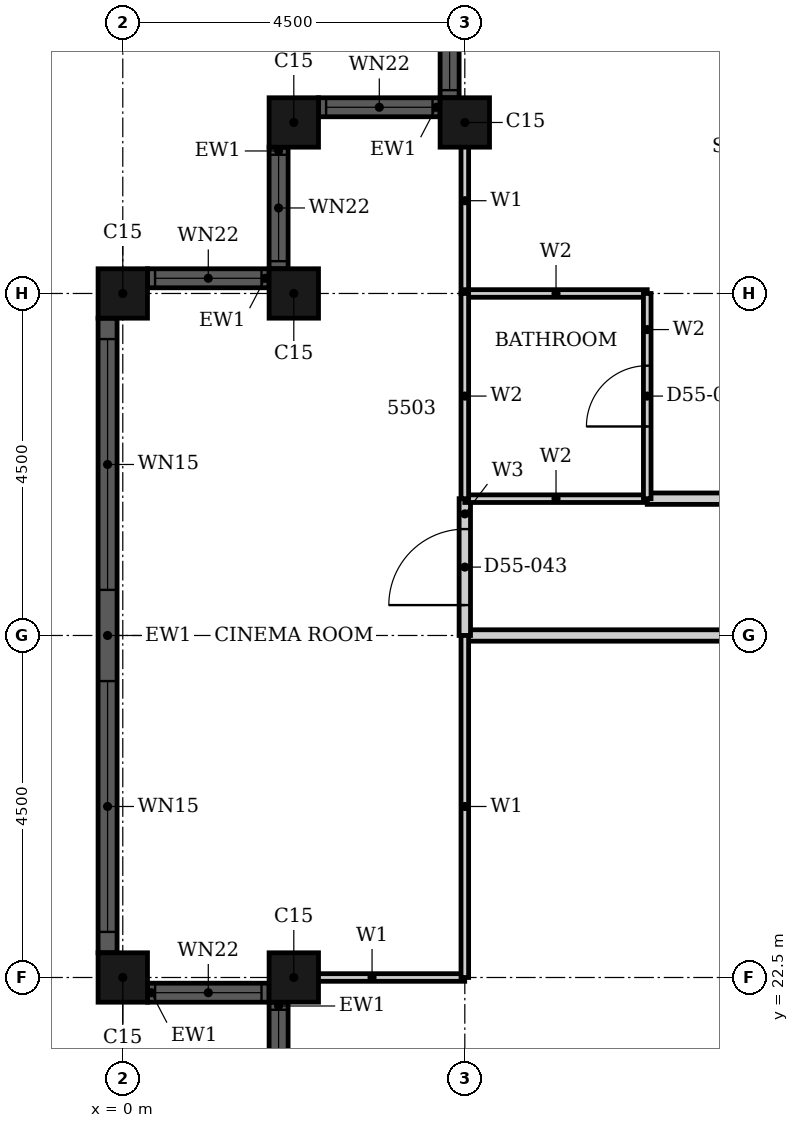
"""IFC4 building model, lengths in metres.
Left out: names, types, materials, properties, quantities, classifications, styles, units other than length and angle.
Written with IfcOpenShell. Run it as: python <this file> out.ifc"""

import sys

from ifc_helpers import new_model, si_unit, direction, frame, frame_2d, origin, origin_2d, place, context, subcontext, project, spatial, rectangle, hollow_rectangle, extrude, element, fill, save


model = new_model("IFC4")
c1 = context("Model", 3, precision=1e-05, world=origin(), true_north=direction((0.0, 1.0)))
c2 = subcontext(c1, "Body", "Model", "MODEL_VIEW")
j1 = project(units=[si_unit("LENGTHUNIT", "METRE"), si_unit("PLANEANGLEUNIT", "RADIAN")], contexts=[c1])
p1 = place(None, origin())
s1 = spatial("IfcSite", under=j1, at=p1, CompositionType="ELEMENT")
p2 = place(p1, origin())
s2 = spatial("IfcBuilding", under=s1, at=p2, CompositionType="ELEMENT")
p3 = place(p2, frame((0.0, 0.0, 218.3)))
s3 = spatial("IfcBuildingStorey", under=s2, at=p3, CompositionType="ELEMENT", Elevation=218.3)
for number, where, z_axis, x_axis in (
    (1, (4.5, 33.75, 0.0), (0.0, 0.0, 1.0), (1.0, 0.0, 0.0)),
    (2, (2.25, 33.75, 0.0), (0.0, 0.0, 1.0), (1.0, 0.0, 0.0)),
    (3, (2.25, 31.5, 0.0), (0.0, 0.0, 1.0), (1.0, 0.0, 0.0)),
    (4, (0.0, 31.5, 0.0), (0.0, 0.0, 1.0), (1.0, 0.0, 0.0)),
    (5, (0.0, 22.5, 0.0), (0.0, 0.0, 1.0), (1.0, 0.0, 0.0)),
    (6, (2.25, 22.5, 0.0), (0.0, 0.0, 1.0), (1.0, 0.0, 0.0)),
):
    element("IfcColumn", number, at=place(p3, frame(where, z_axis=z_axis, x_axis=x_axis)), inside=s3, PredefinedType="COLUMN", context=c2, shape_type="SweptSolid", body=[
        extrude(hollow_rectangle(XDim=0.65, YDim=0.65, WallThickness=0.021, at=origin_2d()), origin(), (0.0, 0.0, 1.0), 3.7),
    ])
p4 = place(p3, frame((4.3, 35.675, 0.0), z_axis=(0.0, 0.0, 1.0), x_axis=(0.0, -1.0, 0.0)))
e7 = element("IfcWall", 7, at=p4, inside=s3, PredefinedType="SOLIDWALL", context=c2, shape_type="SweptSolid", body=[
    extrude(rectangle(XDim=1.6, YDim=0.25, at=frame_2d((0.8, 0.0))), origin(), (0.0, 0.0, 1.0), 3.7),
])
p5 = place(p4, frame((0.1, 0.0, 0.9)))
e8 = element("IfcOpeningElement", 8, at=p5, cuts=e7, PredefinedType="OPENING", context=c2, shape_type="SweptSolid", body=[
    extrude(rectangle(XDim=1.4, YDim=1.85, at=frame_2d((0.7, 0.925))), frame((0.0, 0.135, 0.0), z_axis=(0.0, -1.0, 0.0), x_axis=(1.0, 0.0, 0.0)), (0.0, 0.0, 1.0), 0.27),
])
p6 = place(p3, frame((4.175, 33.95, 0.0), z_axis=(0.0, 0.0, 1.0), x_axis=(-1.0, 0.0, 0.0)))
e9 = element("IfcWall", 9, at=p6, inside=s3, PredefinedType="SOLIDWALL", context=c2, shape_type="SweptSolid", body=[
    extrude(rectangle(XDim=1.6, YDim=0.25, at=frame_2d((0.8, 0.0))), origin(), (0.0, 0.0, 1.0), 3.7),
])
p7 = place(p6, frame((0.1, 0.0, 0.9)))
e10 = element("IfcOpeningElement", 10, at=p7, cuts=e9, PredefinedType="OPENING", context=c2, shape_type="SweptSolid", body=[
    extrude(rectangle(XDim=1.4, YDim=1.85, at=frame_2d((0.7, 0.925))), frame((0.0, 0.135, 0.0), z_axis=(0.0, -1.0, 0.0), x_axis=(1.0, 0.0, 0.0)), (0.0, 0.0, 1.0), 0.27),
])
p8 = place(p3, frame((2.05, 33.425, 0.0), z_axis=(0.0, 0.0, 1.0), x_axis=(0.0, -1.0, 0.0)))
e11 = element("IfcWall", 11, at=p8, inside=s3, PredefinedType="SOLIDWALL", context=c2, shape_type="SweptSolid", body=[
    extrude(rectangle(XDim=1.6, YDim=0.25, at=frame_2d((0.8, 0.0))), origin(), (0.0, 0.0, 1.0), 3.7),
])
p9 = place(p8, frame((0.1, 0.0, 0.9)))
e12 = element("IfcOpeningElement", 12, at=p9, cuts=e11, PredefinedType="OPENING", context=c2, shape_type="SweptSolid", body=[
    extrude(rectangle(XDim=1.4, YDim=1.85, at=frame_2d((0.7, 0.925))), frame((0.0, 0.135, 0.0), z_axis=(0.0, -1.0, 0.0), x_axis=(1.0, 0.0, 0.0)), (0.0, 0.0, 1.0), 0.27),
])
p10 = place(p3, frame((1.925, 31.7, 0.0), z_axis=(0.0, 0.0, 1.0), x_axis=(-1.0, 0.0, 0.0)))
e13 = element("IfcWall", 13, at=p10, inside=s3, PredefinedType="SOLIDWALL", context=c2, shape_type="SweptSolid", body=[
    extrude(rectangle(XDim=1.6, YDim=0.25, at=frame_2d((0.8, 0.0))), origin(), (0.0, 0.0, 1.0), 3.7),
])
p11 = place(p10, frame((0.1, 0.0, 0.9)))
e14 = element("IfcOpeningElement", 14, at=p11, cuts=e13, PredefinedType="OPENING", context=c2, shape_type="SweptSolid", body=[
    extrude(rectangle(XDim=1.4, YDim=1.85, at=frame_2d((0.7, 0.925))), frame((0.0, 0.135, 0.0), z_axis=(0.0, -1.0, 0.0), x_axis=(1.0, 0.0, 0.0)), (0.0, 0.0, 1.0), 0.27),
])
p12 = place(p3, frame((-0.2, 31.175, 0.0), z_axis=(0.0, 0.0, 1.0), x_axis=(0.0, -1.0, 0.0)))
e15 = element("IfcWall", 15, at=p12, inside=s3, PredefinedType="SOLIDWALL", context=c2, shape_type="SweptSolid", body=[
    extrude(rectangle(XDim=8.35, YDim=0.25, at=frame_2d((4.175, 0.0))), origin(), (0.0, 0.0, 1.0), 3.7),
])
p13 = place(p12, frame((0.275, 0.0, 0.45)))
e16 = element("IfcOpeningElement", 16, at=p13, cuts=e15, PredefinedType="OPENING", context=c2, shape_type="SweptSolid", body=[
    extrude(rectangle(XDim=3.3, YDim=2.3, at=frame_2d((1.65, 1.15))), frame((0.0, 0.135, 0.0), z_axis=(0.0, -1.0, 0.0), x_axis=(1.0, 0.0, 0.0)), (0.0, 0.0, 1.0), 0.27),
])
p14 = place(p12, frame((4.775, 0.0, 0.45)))
e17 = element("IfcOpeningElement", 17, at=p14, cuts=e15, PredefinedType="OPENING", context=c2, shape_type="SweptSolid", body=[
    extrude(rectangle(XDim=3.3, YDim=2.3, at=frame_2d((1.65, 1.15))), frame((0.0, 0.135, 0.0), z_axis=(0.0, -1.0, 0.0), x_axis=(1.0, 0.0, 0.0)), (0.0, 0.0, 1.0), 0.27),
])
p15 = place(p3, frame((0.325, 22.3, 0.0), z_axis=(0.0, 0.0, 1.0), x_axis=(1.0, 0.0, 0.0)))
e18 = element("IfcWall", 18, at=p15, inside=s3, PredefinedType="SOLIDWALL", context=c2, shape_type="SweptSolid", body=[
    extrude(rectangle(XDim=1.6, YDim=0.25, at=frame_2d((0.8, 0.0))), origin(), (0.0, 0.0, 1.0), 3.7),
])
p16 = place(p15, frame((0.1, 0.0, 0.9)))
e19 = element("IfcOpeningElement", 19, at=p16, cuts=e18, PredefinedType="OPENING", context=c2, shape_type="SweptSolid", body=[
    extrude(rectangle(XDim=1.4, YDim=1.85, at=frame_2d((0.7, 0.925))), frame((0.0, 0.135, 0.0), z_axis=(0.0, -1.0, 0.0), x_axis=(1.0, 0.0, 0.0)), (0.0, 0.0, 1.0), 0.27),
])
p17 = place(p3, frame((2.05, 22.175, 0.0), z_axis=(0.0, 0.0, 1.0), x_axis=(0.0, -1.0, 0.0)))
e20 = element("IfcWall", 20, at=p17, inside=s3, PredefinedType="SOLIDWALL", context=c2, shape_type="SweptSolid", body=[
    extrude(rectangle(XDim=1.6, YDim=0.25, at=frame_2d((0.8, 0.0))), origin(), (0.0, 0.0, 1.0), 3.7),
])
p18 = place(p17, frame((0.1, 0.0, 0.9)))
e21 = element("IfcOpeningElement", 21, at=p18, cuts=e20, PredefinedType="OPENING", context=c2, shape_type="SweptSolid", body=[
    extrude(rectangle(XDim=1.4, YDim=1.85, at=frame_2d((0.7, 0.925))), frame((0.0, 0.135, 0.0), z_axis=(0.0, -1.0, 0.0), x_axis=(1.0, 0.0, 0.0)), (0.0, 0.0, 1.0), 0.27),
])
p19 = place(p3, frame((4.5, 27.0, 0.0), z_axis=(0.0, 0.0, 1.0), x_axis=(1.0, 0.0, 0.0)))
e22 = element("IfcWall", 22, at=p19, inside=s3, PredefinedType="PARTITIONING", context=c2, shape_type="SweptSolid", body=[
    extrude(rectangle(XDim=13.5, YDim=0.15, at=frame_2d((6.75, 0.0))), origin(), (0.0, 0.0, 1.0), 2.68),
])
p20 = place(p19, frame((5.35, 0.0, 0.0)))
e23 = element("IfcOpeningElement", 23, at=p20, cuts=e22, PredefinedType="OPENING", context=c2, shape_type="SweptSolid", body=[
    extrude(rectangle(XDim=1.0, YDim=2.1, at=frame_2d((0.5, 1.05))), frame((0.0, 0.085, 0.0), z_axis=(0.0, -1.0, 0.0), x_axis=(1.0, 0.0, 0.0)), (0.0, 0.0, 1.0), 0.17),
])
p21 = place(p3, frame((6.9, 28.8, 0.0), z_axis=(0.0, 0.0, 1.0), x_axis=(1.0, 0.0, 0.0)))
e24 = element("IfcWall", 24, at=p21, inside=s3, PredefinedType="PARTITIONING", context=c2, shape_type="SweptSolid", body=[
    extrude(rectangle(XDim=9.299, YDim=0.15, at=frame_2d((4.649, 0.0))), origin(), (0.0, 0.0, 1.0), 3.4),
])
p22 = place(p3, frame((4.5, 27.0, 0.0), z_axis=(0.0, 0.0, 1.0), x_axis=(0.0, 1.0, 0.0)))
e25 = element("IfcWall", 25, at=p22, inside=s3, PredefinedType="PARTITIONING", context=c2, shape_type="SweptSolid", body=[
    extrude(rectangle(XDim=1.8, YDim=0.15, at=frame_2d((0.9, 0.0))), origin(), (0.0, 0.0, 1.0), 3.4),
])
p23 = place(p22, frame((0.4, 0.0, 0.0)))
e26 = element("IfcOpeningElement", 26, at=p23, cuts=e25, PredefinedType="OPENING", context=c2, shape_type="SweptSolid", body=[
    extrude(rectangle(XDim=1.0, YDim=2.1, at=frame_2d((0.5, 1.05))), frame((0.0, 0.085, 0.0), z_axis=(0.0, -1.0, 0.0), x_axis=(1.0, 0.0, 0.0)), (0.0, 0.0, 1.0), 0.17),
])
p24 = place(p3, frame((2.06, 22.5, 0.0), z_axis=(0.0, 0.0, 1.0), x_axis=(1.0, 0.0, 0.0)))
e27 = element("IfcWall", 27, at=p24, inside=s3, PredefinedType="PARTITIONING", context=c2, shape_type="SweptSolid", body=[
    extrude(rectangle(XDim=2.439, YDim=0.1, at=frame_2d((1.219, 0.0))), origin(), (0.0, 0.0, 1.0), 2.68),
])
p25 = place(p3, frame((4.5, 31.501, 0.0), z_axis=(0.0, 0.0, 1.0), x_axis=(0.0, 1.0, 0.0)))
e28 = element("IfcWall", 28, at=p25, inside=s3, PredefinedType="PARTITIONING", context=c2, shape_type="SweptSolid", body=[
    extrude(rectangle(XDim=2.439, YDim=0.1, at=frame_2d((1.219, 0.0))), origin(), (0.0, 0.0, 1.0), 3.4),
])
p26 = place(p3, frame((4.5, 22.5, 0.0), z_axis=(0.0, 0.0, 1.0), x_axis=(0.0, 1.0, 0.0)))
e29 = element("IfcWall", 29, at=p26, inside=s3, PredefinedType="PARTITIONING", context=c2, shape_type="SweptSolid", body=[
    extrude(rectangle(XDim=4.5, YDim=0.1, at=frame_2d((2.25, 0.0))), origin(), (0.0, 0.0, 1.0), 3.4),
])
p27 = place(p3, frame((4.5, 28.8, 0.0), z_axis=(0.0, 0.0, 1.0), x_axis=(1.0, 0.0, 0.0)))
e30 = element("IfcWall", 30, at=p27, inside=s3, PredefinedType="PARTITIONING", context=c2, shape_type="SweptSolid", body=[
    extrude(rectangle(XDim=2.4, YDim=0.1, at=frame_2d((1.2, 0.0))), origin(), (0.0, 0.0, 1.0), 3.4),
])
p28 = place(p3, frame((4.5, 31.5, 0.0), z_axis=(0.0, 0.0, 1.0), x_axis=(1.0, 0.0, 0.0)))
e31 = element("IfcWall", 31, at=p28, inside=s3, PredefinedType="PARTITIONING", context=c2, shape_type="SweptSolid", body=[
    extrude(rectangle(XDim=2.4, YDim=0.1, at=frame_2d((1.2, 0.0))), origin(), (0.0, 0.0, 1.0), 2.68),
])
p29 = place(p3, frame((4.5, 28.8, 0.0), z_axis=(0.0, 0.0, 1.0), x_axis=(0.0, 1.0, 0.0)))
e32 = element("IfcWall", 32, at=p29, inside=s3, PredefinedType="PARTITIONING", context=c2, shape_type="SweptSolid", body=[
    extrude(rectangle(XDim=2.7, YDim=0.1, at=frame_2d((1.35, 0.0))), origin(), (0.0, 0.0, 1.0), 3.4),
])
p30 = place(p3, frame((6.9, 28.8, 0.0), z_axis=(0.0, 0.0, 1.0), x_axis=(0.0, 1.0, 0.0)))
e33 = element("IfcWall", 33, at=p30, inside=s3, PredefinedType="PARTITIONING", context=c2, shape_type="SweptSolid", body=[
    extrude(rectangle(XDim=2.7, YDim=0.1, at=frame_2d((1.35, 0.0))), origin(), (0.0, 0.0, 1.0), 3.4),
])
p31 = place(p30, frame((0.95, 0.0, 0.0)))
e34 = element("IfcOpeningElement", 34, at=p31, cuts=e33, PredefinedType="OPENING", context=c2, shape_type="SweptSolid", body=[
    extrude(rectangle(XDim=0.8, YDim=2.1, at=frame_2d((0.4, 1.05))), frame((0.0, 0.06, 0.0), z_axis=(0.0, -1.0, 0.0), x_axis=(1.0, 0.0, 0.0)), (0.0, 0.0, 1.0), 0.12),
])
p32 = place(p5, origin())
e35 = element("IfcWindow", 35, at=p32, inside=s3, PartitioningType="SINGLE_PANEL", PredefinedType="WINDOW", context=c2, shape_type="SweptSolid", body=[
    extrude(rectangle(XDim=1.4, YDim=1.85, at=frame_2d((0.7, 0.925))), frame((0.0, 0.03, 0.0), z_axis=(0.0, -1.0, 0.0), x_axis=(1.0, 0.0, 0.0)), (0.0, 0.0, 1.0), 0.06),
])
fill(e8, e35)
p33 = place(p7, origin())
e36 = element("IfcWindow", 36, at=p33, inside=s3, PartitioningType="SINGLE_PANEL", PredefinedType="WINDOW", context=c2, shape_type="SweptSolid", body=[
    extrude(rectangle(XDim=1.4, YDim=1.85, at=frame_2d((0.7, 0.925))), frame((0.0, 0.03, 0.0), z_axis=(0.0, -1.0, 0.0), x_axis=(1.0, 0.0, 0.0)), (0.0, 0.0, 1.0), 0.06),
])
fill(e10, e36)
p34 = place(p9, origin())
e37 = element("IfcWindow", 37, at=p34, inside=s3, PartitioningType="SINGLE_PANEL", PredefinedType="WINDOW", context=c2, shape_type="SweptSolid", body=[
    extrude(rectangle(XDim=1.4, YDim=1.85, at=frame_2d((0.7, 0.925))), frame((0.0, 0.03, 0.0), z_axis=(0.0, -1.0, 0.0), x_axis=(1.0, 0.0, 0.0)), (0.0, 0.0, 1.0), 0.06),
])
fill(e12, e37)
p35 = place(p11, origin())
e38 = element("IfcWindow", 38, at=p35, inside=s3, PartitioningType="SINGLE_PANEL", PredefinedType="WINDOW", context=c2, shape_type="SweptSolid", body=[
    extrude(rectangle(XDim=1.4, YDim=1.85, at=frame_2d((0.7, 0.925))), frame((0.0, 0.03, 0.0), z_axis=(0.0, -1.0, 0.0), x_axis=(1.0, 0.0, 0.0)), (0.0, 0.0, 1.0), 0.06),
])
fill(e14, e38)
p36 = place(p13, origin())
e39 = element("IfcWindow", 39, at=p36, inside=s3, PartitioningType="SINGLE_PANEL", PredefinedType="WINDOW", context=c2, shape_type="SweptSolid", body=[
    extrude(rectangle(XDim=3.3, YDim=2.3, at=frame_2d((1.65, 1.15))), frame((0.0, 0.03, 0.0), z_axis=(0.0, -1.0, 0.0), x_axis=(1.0, 0.0, 0.0)), (0.0, 0.0, 1.0), 0.06),
])
fill(e16, e39)
p37 = place(p14, origin())
e40 = element("IfcWindow", 40, at=p37, inside=s3, PartitioningType="SINGLE_PANEL", PredefinedType="WINDOW", context=c2, shape_type="SweptSolid", body=[
    extrude(rectangle(XDim=3.3, YDim=2.3, at=frame_2d((1.65, 1.15))), frame((0.0, 0.03, 0.0), z_axis=(0.0, -1.0, 0.0), x_axis=(1.0, 0.0, 0.0)), (0.0, 0.0, 1.0), 0.06),
])
fill(e17, e40)
p38 = place(p16, origin())
e41 = element("IfcWindow", 41, at=p38, inside=s3, PartitioningType="SINGLE_PANEL", PredefinedType="WINDOW", context=c2, shape_type="SweptSolid", body=[
    extrude(rectangle(XDim=1.4, YDim=1.85, at=frame_2d((0.7, 0.925))), frame((0.0, 0.03, 0.0), z_axis=(0.0, -1.0, 0.0), x_axis=(1.0, 0.0, 0.0)), (0.0, 0.0, 1.0), 0.06),
])
fill(e19, e41)
p39 = place(p18, origin())
e42 = element("IfcWindow", 42, at=p39, inside=s3, PartitioningType="SINGLE_PANEL", PredefinedType="WINDOW", context=c2, shape_type="SweptSolid", body=[
    extrude(rectangle(XDim=1.4, YDim=1.85, at=frame_2d((0.7, 0.925))), frame((0.0, 0.03, 0.0), z_axis=(0.0, -1.0, 0.0), x_axis=(1.0, 0.0, 0.0)), (0.0, 0.0, 1.0), 0.06),
])
fill(e21, e42)
p40 = place(p31, origin())
e43 = element("IfcDoor", 43, at=p40, inside=s3, OperationType="SINGLE_SWING_LEFT", PredefinedType="DOOR", context=c2, shape_type="SweptSolid", body=[
    extrude(rectangle(XDim=0.8, YDim=2.1, at=frame_2d((0.4, 1.05))), frame((0.0, 0.025, 0.0), z_axis=(0.0, -1.0, 0.0), x_axis=(1.0, 0.0, 0.0)), (0.0, 0.0, 1.0), 0.05),
])
fill(e34, e43)
p41 = place(p23, origin())
e44 = element("IfcDoor", 44, at=p41, inside=s3, OperationType="SINGLE_SWING_RIGHT", PredefinedType="DOOR", context=c2, shape_type="SweptSolid", body=[
    extrude(rectangle(XDim=1.0, YDim=2.1, at=frame_2d((0.5, 1.05))), frame((0.0, 0.025, 0.0), z_axis=(0.0, -1.0, 0.0), x_axis=(1.0, 0.0, 0.0)), (0.0, 0.0, 1.0), 0.05),
])
fill(e26, e44)
save(model, sys.argv[1])
